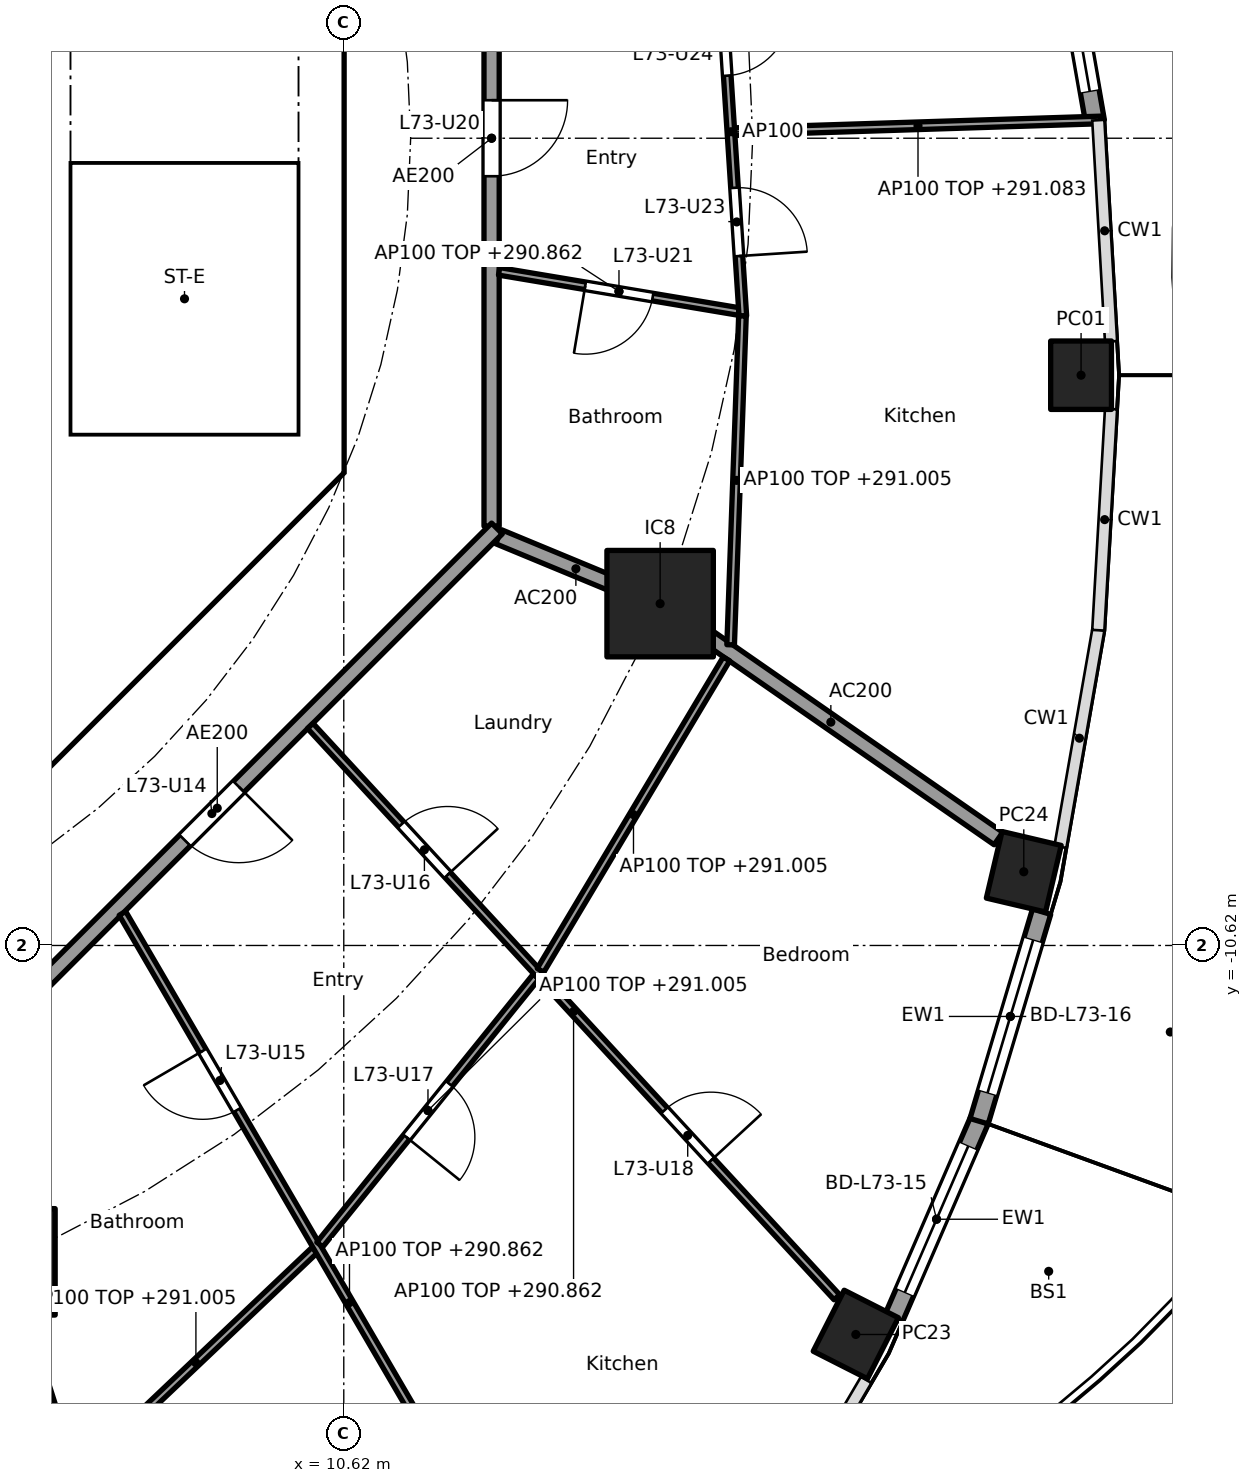
"""IFC4 building model, lengths in metres.
Left out: names, types, materials, properties, quantities, classifications, styles, units other than length and angle.
Written with IfcOpenShell. Run it as: python <this file> out.ifc"""

import sys

from ifc_helpers import new_model, si_unit, direction, frame, frame_2d, origin, origin_2d, place, context, subcontext, project, spatial, polyline, rectangle, hollow_rectangle, outline, extrude, element, fill, save


model = new_model("IFC4")
c1 = context("Model", 3, precision=1e-05, world=origin(), true_north=direction((0.0, 1.0)))
c2 = subcontext(c1, "Body", "Model", "MODEL_VIEW")
j1 = project(units=[si_unit("LENGTHUNIT", "METRE"), si_unit("PLANEANGLEUNIT", "RADIAN")], contexts=[c1])
p1 = place(None, origin())
s1 = spatial("IfcSite", under=j1, at=p1, CompositionType="ELEMENT")
p2 = place(p1, origin())
s2 = spatial("IfcBuilding", under=s1, at=p2, CompositionType="ELEMENT")
p3 = place(p2, frame((0.0, 0.0, 288.1)))
s3 = spatial("IfcBuildingStorey", under=s2, at=p3, CompositionType="ELEMENT", Elevation=288.1)
for number, where, z_axis, x_axis in (
    (1, (20.32, -3.118, 0.0), (0.0, 0.0, 1.0), (0.0, 1.0, 0.0)),
    (2, (17.356, -15.738, 0.0), (0.0, 0.0, 1.0), (0.452, 0.892, 0.0)),
    (3, (19.566, -9.65, 0.0), (0.0, 0.0, 1.0), (0.229, 0.973, 0.0)),
):
    element("IfcColumn", number, at=place(p3, frame(where, z_axis=z_axis, x_axis=x_axis)), inside=s3, PredefinedType="COLUMN", context=c2, shape_type="SweptSolid", body=[
        extrude(hollow_rectangle(XDim=0.9, YDim=0.8, WallThickness=0.028, at=origin_2d()), origin(), (0.0, 0.0, 1.0), 3.7),
    ])
for number, where, z_axis, x_axis in (
    (4, (6.123, -14.782, 0.0), (0.0, 0.0, 1.0), (1.0, 0.0, 0.0)),
    (5, (14.782, -6.123, 0.0), (0.0, 0.0, 1.0), (1.0, 0.0, 0.0)),
):
    element("IfcColumn", number, at=place(p3, frame(where, z_axis=z_axis, x_axis=x_axis)), inside=s3, PredefinedType="COLUMN", context=c2, shape_type="SweptSolid", body=[
        extrude(rectangle(XDim=1.4, YDim=1.4, at=origin_2d()), origin(), (0.0, 0.0, 1.0), 3.7),
    ])
p4 = place(p3, frame((20.004, 3.08, 0.0), z_axis=(0.0, 0.0, 1.0), x_axis=(0.172182411767, -0.985065082661, 0.0)))
e6 = element("IfcWall", 6, at=p4, inside=s3, PredefinedType="SOLIDWALL", context=c2, shape_type="SweptSolid", body=[
    extrude(rectangle(XDim=2.903, YDim=0.25, at=frame_2d((1.451, 0.0))), origin(), (0.0, 0.0, 1.0), 3.44),
])
p5 = place(p4, frame((0.401, 0.0, 0.0)))
e7 = element("IfcOpeningElement", 7, at=p5, cuts=e6, PredefinedType="OPENING", context=c2, shape_type="SweptSolid", body=[
    extrude(rectangle(XDim=2.1, YDim=2.4, at=frame_2d((1.05, 1.2))), frame((0.0, 0.135, 0.0), z_axis=(0.0, -1.0, 0.0), x_axis=(1.0, 0.0, 0.0)), (0.0, 0.0, 1.0), 0.27),
])
p6 = place(p3, frame((18.983, -12.918, 0.0), z_axis=(0.0, 0.0, 1.0), x_axis=(-0.397597791596, -0.9175598052, 0.0)))
e8 = element("IfcWall", 8, at=p6, inside=s3, PredefinedType="SOLIDWALL", context=c2, shape_type="SweptSolid", body=[
    extrude(rectangle(XDim=2.841, YDim=0.25, at=frame_2d((1.42, 0.0))), origin(), (0.0, 0.0, 1.0), 3.44),
])
p7 = place(p6, frame((0.371, 0.0, 0.0)))
e9 = element("IfcOpeningElement", 9, at=p7, cuts=e8, PredefinedType="OPENING", context=c2, shape_type="SweptSolid", body=[
    extrude(rectangle(XDim=2.1, YDim=2.4, at=frame_2d((1.05, 1.2))), frame((0.0, 0.135, 0.0), z_axis=(0.0, -1.0, 0.0), x_axis=(1.0, 0.0, 0.0)), (0.0, 0.0, 1.0), 0.27),
])
p8 = place(p3, frame((19.801, -10.175, 0.0), z_axis=(0.0, 0.0, 1.0), x_axis=(-0.285899456462, -0.958259620768, 0.0)))
e10 = element("IfcWall", 10, at=p8, inside=s3, PredefinedType="SOLIDWALL", context=c2, shape_type="SweptSolid", body=[
    extrude(rectangle(XDim=2.877, YDim=0.25, at=frame_2d((1.438, 0.0))), origin(), (0.0, 0.0, 1.0), 3.44),
])
p9 = place(p8, frame((0.389, 0.0, 0.0)))
e11 = element("IfcOpeningElement", 11, at=p9, cuts=e10, PredefinedType="OPENING", context=c2, shape_type="SweptSolid", body=[
    extrude(rectangle(XDim=2.1, YDim=2.4, at=frame_2d((1.05, 1.2))), frame((0.0, 0.135, 0.0), z_axis=(0.0, -1.0, 0.0), x_axis=(1.0, 0.0, 0.0)), (0.0, 0.0, 1.0), 0.27),
])
p10 = place(p3, frame((4.613, -9.988, 0.0), z_axis=(0.0, 0.0, 1.0), x_axis=(0.707106781187, 0.707106781187, 0.0)))
e12 = element("IfcWall", 12, at=p10, inside=s3, PredefinedType="SHEAR", context=c2, shape_type="SweptSolid", body=[
    extrude(rectangle(XDim=7.602, YDim=0.6, at=frame_2d((3.801, 0.0))), origin(), (0.0, 0.0, 1.0), 3.44),
])
p11 = place(p10, frame((3.201, 0.0, 0.0)))
e13 = element("IfcOpeningElement", 13, at=p11, cuts=e12, PredefinedType="OPENING", context=c2, shape_type="SweptSolid", body=[
    extrude(rectangle(XDim=1.2, YDim=2.1, at=frame_2d((0.6, 1.05))), frame((0.0, 0.31, 0.0), z_axis=(0.0, -1.0, 0.0), x_axis=(1.0, 0.0, 0.0)), (0.0, 0.0, 1.0), 0.62),
])
p12 = place(p3, origin())
e14 = element("IfcWall", 14, at=p12, inside=s3, PredefinedType="SHEAR", context=c2, shape_type="SweptSolid", body=[
    extrude(outline(polyline([(9.776, -4.401), (10.025, -4.152), (10.025, -3.801), (10.025, 4.152), (9.776, 4.401), (10.2, 4.825), (10.625, 4.401), (10.625, -4.401), (10.2, -4.825), (9.776, -4.401)])), origin(), (0.0, 0.0, 1.0), 3.44),
])
p13 = place(p3, origin())
e15 = element("IfcWall", 15, at=p13, inside=s3, PredefinedType="SOLIDWALL", context=c2, shape_type="SweptSolid", body=[
    extrude(outline(polyline([(7.025, -3.9), (6.7, -3.9), (6.7, 3.9), (7.025, 3.9), (7.025, -3.9)])), origin(), (0.0, 0.0, 1.0), 3.44),
])
p14 = place(p3, origin())
e16 = element("IfcWall", 16, at=p14, inside=s3, PredefinedType="SOLIDWALL", context=c2, shape_type="SweptSolid", body=[
    extrude(outline(polyline([(10.025, -4.1), (6.7, -4.1), (6.7, -3.9), (10.025, -3.9), (10.025, -4.1)])), origin(), (0.0, 0.0, 1.0), 3.44),
])
p15 = place(p3, frame((6.138, -14.83, 0.0), z_axis=(0.0, 0.0, 1.0), x_axis=(0.303653679037, -0.952782474234, 0.0)))
e17 = element("IfcWall", 17, at=p15, inside=s3, PredefinedType="PARTITIONING", context=c2, shape_type="SweptSolid", body=[
    extrude(rectangle(XDim=10.076, YDim=0.2, at=frame_2d((5.038, 0.0))), origin(), (0.0, 0.0, 1.0), 2.905),
])
p16 = place(p3, frame((12.657, -5.243, 0.0), z_axis=(0.0, 0.0, 1.0), x_axis=(0.92383017907, -0.382802560388, 0.0)))
e18 = element("IfcWall", 18, at=p16, inside=s3, PredefinedType="PARTITIONING", context=c2, shape_type="SweptSolid", body=[
    extrude(rectangle(XDim=2.2, YDim=0.2, at=frame_2d((1.1, 0.0))), origin(), (0.0, 0.0, 1.0), 3.44),
])
p17 = place(p3, frame((14.823, -6.151, 0.0), z_axis=(0.0, 0.0, 1.0), x_axis=(0.821435065081, -0.570302054928, 0.0)))
e19 = element("IfcWall", 19, at=p17, inside=s3, PredefinedType="PARTITIONING", context=c2, shape_type="SweptSolid", body=[
    extrude(rectangle(XDim=5.368, YDim=0.2, at=frame_2d((2.684, 0.0))), origin(), (0.0, 0.0, 1.0), 3.44),
])
p18 = place(p3, frame((12.565, -5.104, 0.0), z_axis=(0.0, 0.0, 1.0), x_axis=(0.0, 1.0, 0.0)))
e20 = element("IfcWall", 20, at=p18, inside=s3, PredefinedType="PARTITIONING", context=c2, shape_type="SweptSolid", body=[
    extrude(rectangle(XDim=10.209, YDim=0.2, at=frame_2d((5.104, 0.0))), origin(), (0.0, 0.0, 1.0), 3.44),
])
p19 = place(p18, frame((4.604, 0.0, 0.0)))
e21 = element("IfcOpeningElement", 21, at=p19, cuts=e20, PredefinedType="OPENING", context=c2, shape_type="SweptSolid", body=[
    extrude(rectangle(XDim=1.0, YDim=2.1, at=frame_2d((0.5, 1.05))), frame((0.0, 0.11, 0.0), z_axis=(0.0, -1.0, 0.0), x_axis=(1.0, 0.0, 0.0)), (0.0, 0.0, 1.0), 0.22),
])
p20 = place(p3, frame((5.275, -12.494, 0.0), z_axis=(0.0, 0.0, 1.0), x_axis=(0.707106781187, 0.707106781187, 0.0)))
e22 = element("IfcWall", 22, at=p20, inside=s3, PredefinedType="PARTITIONING", context=c2, shape_type="SweptSolid", body=[
    extrude(rectangle(XDim=10.409, YDim=0.2, at=frame_2d((5.205, 0.0))), origin(), (0.0, 0.0, 1.0), 3.44),
])
p21 = place(p20, frame((4.604, 0.0, 0.0)))
e23 = element("IfcOpeningElement", 23, at=p21, cuts=e22, PredefinedType="OPENING", context=c2, shape_type="SweptSolid", body=[
    extrude(rectangle(XDim=1.0, YDim=2.1, at=frame_2d((0.5, 1.05))), frame((0.0, 0.11, 0.0), z_axis=(0.0, -1.0, 0.0), x_axis=(1.0, 0.0, 0.0)), (0.0, 0.0, 1.0), 0.22),
])
p22 = place(p3, frame((12.663, -1.751, 0.0), z_axis=(0.0, 0.0, 1.0), x_axis=(0.98626156497, -0.165191178529, 0.0)))
e24 = element("IfcWall", 24, at=p22, inside=s3, PredefinedType="PARTITIONING", context=c2, shape_type="SweptSolid", body=[
    extrude(rectangle(XDim=3.198, YDim=0.1, at=frame_2d((1.599, 0.0))), origin(), (0.0, 0.0, 1.0), 2.762),
])
p23 = place(p22, frame((1.149, 0.0, 0.0)))
e25 = element("IfcOpeningElement", 25, at=p23, cuts=e24, PredefinedType="OPENING", context=c2, shape_type="SweptSolid", body=[
    extrude(rectangle(XDim=0.9, YDim=2.1, at=frame_2d((0.45, 1.05))), frame((0.0, 0.06, 0.0), z_axis=(0.0, -1.0, 0.0), x_axis=(1.0, 0.0, 0.0)), (0.0, 0.0, 1.0), 0.12),
])
p24 = place(p3, frame((15.87, -2.338, 0.0), z_axis=(0.0, 0.0, 1.0), x_axis=(-0.064797294757, 0.997898447034, 0.0)))
e26 = element("IfcWall", 26, at=p24, inside=s3, PredefinedType="PARTITIONING", context=c2, shape_type="SweptSolid", body=[
    extrude(rectangle(XDim=4.857, YDim=0.1, at=frame_2d((2.428, 0.0))), origin(), (0.0, 0.0, 1.0), 3.44),
])
p25 = place(p24, frame((0.789, 0.0, 0.0)))
e27 = element("IfcOpeningElement", 27, at=p25, cuts=e26, PredefinedType="OPENING", context=c2, shape_type="SweptSolid", body=[
    extrude(rectangle(XDim=0.9, YDim=2.1, at=frame_2d((0.45, 1.05))), frame((0.0, 0.06, 0.0), z_axis=(0.0, -1.0, 0.0), x_axis=(1.0, 0.0, 0.0)), (0.0, 0.0, 1.0), 0.12),
])
p26 = place(p24, frame((3.167, 0.0, 0.0)))
e28 = element("IfcOpeningElement", 28, at=p26, cuts=e26, PredefinedType="OPENING", context=c2, shape_type="SweptSolid", body=[
    extrude(rectangle(XDim=0.9, YDim=2.1, at=frame_2d((0.45, 1.05))), frame((0.0, 0.06, 0.0), z_axis=(0.0, -1.0, 0.0), x_axis=(1.0, 0.0, 0.0)), (0.0, 0.0, 1.0), 0.12),
])
p27 = place(p3, frame((15.865, -2.338, 0.0), z_axis=(0.0, 0.0, 1.0), x_axis=(-0.035864509465, -0.999356661538, 0.0)))
e29 = element("IfcWall", 29, at=p27, inside=s3, PredefinedType="PARTITIONING", context=c2, shape_type="SweptSolid", body=[
    extrude(rectangle(XDim=4.329, YDim=0.1, at=frame_2d((2.165, 0.0))), origin(), (0.0, 0.0, 1.0), 2.905),
])
p28 = place(p3, frame((15.763, 0.087, 0.0), z_axis=(0.0, 0.0, 1.0), x_axis=(0.999492034598, 0.03186962151, 0.0)))
e30 = element("IfcWall", 30, at=p28, inside=s3, PredefinedType="PARTITIONING", context=c2, shape_type="SweptSolid", body=[
    extrude(rectangle(XDim=4.826, YDim=0.1, at=frame_2d((2.413, 0.0))), origin(), (0.0, 0.0, 1.0), 2.983),
])
p29 = place(p3, frame((7.113, -17.592, 0.0), z_axis=(0.0, 0.0, 1.0), x_axis=(0.725433932329, 0.688291805723, 0.0)))
e31 = element("IfcWall", 31, at=p29, inside=s3, PredefinedType="PARTITIONING", context=c2, shape_type="SweptSolid", body=[
    extrude(rectangle(XDim=4.305, YDim=0.1, at=frame_2d((2.153, 0.0))), origin(), (0.0, 0.0, 1.0), 2.905),
])
p30 = place(p3, frame((7.708, -10.198, 0.0), z_axis=(0.0, 0.0, 1.0), x_axis=(0.503839015963, -0.863797572347, 0.0)))
e32 = element("IfcWall", 32, at=p30, inside=s3, PredefinedType="PARTITIONING", context=c2, shape_type="SweptSolid", body=[
    extrude(rectangle(XDim=11.856, YDim=0.1, at=frame_2d((5.928, 0.0))), origin(), (0.0, 0.0, 1.0), 2.762),
])
p31 = place(p30, frame((2.095, 0.0, 0.0)))
e33 = element("IfcOpeningElement", 33, at=p31, cuts=e32, PredefinedType="OPENING", context=c2, shape_type="SweptSolid", body=[
    extrude(rectangle(XDim=0.9, YDim=2.1, at=frame_2d((0.45, 1.05))), frame((0.0, 0.06, 0.0), z_axis=(0.0, -1.0, 0.0), x_axis=(1.0, 0.0, 0.0)), (0.0, 0.0, 1.0), 0.12),
])
p32 = place(p30, frame((8.023, 0.0, 0.0)))
e34 = element("IfcOpeningElement", 34, at=p32, cuts=e32, PredefinedType="OPENING", context=c2, shape_type="SweptSolid", body=[
    extrude(rectangle(XDim=0.9, YDim=2.1, at=frame_2d((0.45, 1.05))), frame((0.0, 0.06, 0.0), z_axis=(0.0, -1.0, 0.0), x_axis=(1.0, 0.0, 0.0)), (0.0, 0.0, 1.0), 0.12),
])
p33 = place(p3, frame((10.304, -14.555, 0.0), z_axis=(0.0, 0.0, 1.0), x_axis=(0.628170338674, 0.778075848237, 0.0)))
e35 = element("IfcWall", 35, at=p33, inside=s3, PredefinedType="PARTITIONING", context=c2, shape_type="SweptSolid", body=[
    extrude(rectangle(XDim=4.532, YDim=0.1, at=frame_2d((2.266, 0.0))), origin(), (0.0, 0.0, 1.0), 2.905),
])
p34 = place(p33, frame((1.816, 0.0, 0.0)))
e36 = element("IfcOpeningElement", 36, at=p34, cuts=e35, PredefinedType="OPENING", context=c2, shape_type="SweptSolid", body=[
    extrude(rectangle(XDim=0.9, YDim=2.1, at=frame_2d((0.45, 1.05))), frame((0.0, 0.06, 0.0), z_axis=(0.0, -1.0, 0.0), x_axis=(1.0, 0.0, 0.0)), (0.0, 0.0, 1.0), 0.12),
])
p35 = place(p3, frame((10.179, -7.731, 0.0), z_axis=(0.0, 0.0, 1.0), x_axis=(0.67775318564, -0.73528947997, 0.0)))
e37 = element("IfcWall", 37, at=p35, inside=s3, PredefinedType="PARTITIONING", context=c2, shape_type="SweptSolid", body=[
    extrude(rectangle(XDim=10.222, YDim=0.1, at=frame_2d((5.111, 0.0))), origin(), (0.0, 0.0, 1.0), 2.762),
])
p36 = place(p35, frame((1.766, 0.0, 0.0)))
e38 = element("IfcOpeningElement", 38, at=p36, cuts=e37, PredefinedType="OPENING", context=c2, shape_type="SweptSolid", body=[
    extrude(rectangle(XDim=0.9, YDim=2.1, at=frame_2d((0.45, 1.05))), frame((0.0, 0.06, 0.0), z_axis=(0.0, -1.0, 0.0), x_axis=(1.0, 0.0, 0.0)), (0.0, 0.0, 1.0), 0.12),
])
p37 = place(p35, frame((6.877, 0.0, 0.0)))
e39 = element("IfcOpeningElement", 39, at=p37, cuts=e37, PredefinedType="OPENING", context=c2, shape_type="SweptSolid", body=[
    extrude(rectangle(XDim=0.9, YDim=2.1, at=frame_2d((0.45, 1.05))), frame((0.0, 0.06, 0.0), z_axis=(0.0, -1.0, 0.0), x_axis=(1.0, 0.0, 0.0)), (0.0, 0.0, 1.0), 0.12),
])
p38 = place(p3, frame((13.208, -10.947, 0.0), z_axis=(0.0, 0.0, 1.0), x_axis=(0.512726452516, 0.858552028063, 0.0)))
e40 = element("IfcWall", 40, at=p38, inside=s3, PredefinedType="PARTITIONING", context=c2, shape_type="SweptSolid", body=[
    extrude(rectangle(XDim=4.772, YDim=0.1, at=frame_2d((2.386, 0.0))), origin(), (0.0, 0.0, 1.0), 2.905),
])
p39 = place(p5, origin())
e41 = element("IfcDoor", 41, at=p39, inside=s3, OperationType="SLIDING_TO_LEFT", PredefinedType="DOOR", context=c2, shape_type="SweptSolid", body=[
    extrude(rectangle(XDim=2.1, YDim=2.4, at=frame_2d((1.05, 1.2))), frame((0.0, 0.025, 0.0), z_axis=(0.0, -1.0, 0.0), x_axis=(1.0, 0.0, 0.0)), (0.0, 0.0, 1.0), 0.05),
])
fill(e7, e41)
p40 = place(p7, origin())
e42 = element("IfcDoor", 42, at=p40, inside=s3, OperationType="SLIDING_TO_LEFT", PredefinedType="DOOR", context=c2, shape_type="SweptSolid", body=[
    extrude(rectangle(XDim=2.1, YDim=2.4, at=frame_2d((1.05, 1.2))), frame((0.0, 0.025, 0.0), z_axis=(0.0, -1.0, 0.0), x_axis=(1.0, 0.0, 0.0)), (0.0, 0.0, 1.0), 0.05),
])
fill(e9, e42)
p41 = place(p9, origin())
e43 = element("IfcDoor", 43, at=p41, inside=s3, OperationType="SLIDING_TO_LEFT", PredefinedType="DOOR", context=c2, shape_type="SweptSolid", body=[
    extrude(rectangle(XDim=2.1, YDim=2.4, at=frame_2d((1.05, 1.2))), frame((0.0, 0.025, 0.0), z_axis=(0.0, -1.0, 0.0), x_axis=(1.0, 0.0, 0.0)), (0.0, 0.0, 1.0), 0.05),
])
fill(e11, e43)
p42 = place(p11, origin())
e44 = element("IfcDoor", 44, at=p42, inside=s3, OperationType="SINGLE_SWING_LEFT", PredefinedType="DOOR", context=c2, shape_type="SweptSolid", body=[
    extrude(rectangle(XDim=1.2, YDim=2.1, at=frame_2d((0.6, 1.05))), frame((0.0, 0.025, 0.0), z_axis=(0.0, -1.0, 0.0), x_axis=(1.0, 0.0, 0.0)), (0.0, 0.0, 1.0), 0.05),
])
fill(e13, e44)
p43 = place(p21, frame((1.0, 0.0, 0.0), x_axis=(-1.0, 0.0, 0.0)))
e45 = element("IfcDoor", 45, at=p43, inside=s3, OperationType="SINGLE_SWING_LEFT", PredefinedType="DOOR", context=c2, shape_type="SweptSolid", body=[
    extrude(rectangle(XDim=1.0, YDim=2.1, at=frame_2d((0.5, 1.05))), frame((0.0, 0.025, 0.0), z_axis=(0.0, -1.0, 0.0), x_axis=(1.0, 0.0, 0.0)), (0.0, 0.0, 1.0), 0.05),
])
fill(e23, e45)
p44 = place(p31, frame((0.9, 0.0, 0.0), x_axis=(-1.0, 0.0, 0.0)))
e46 = element("IfcDoor", 46, at=p44, inside=s3, OperationType="SINGLE_SWING_RIGHT", PredefinedType="DOOR", context=c2, shape_type="SweptSolid", body=[
    extrude(rectangle(XDim=0.9, YDim=2.1, at=frame_2d((0.45, 1.05))), frame((0.0, 0.025, 0.0), z_axis=(0.0, -1.0, 0.0), x_axis=(1.0, 0.0, 0.0)), (0.0, 0.0, 1.0), 0.05),
])
fill(e33, e46)
p45 = place(p36, origin())
e47 = element("IfcDoor", 47, at=p45, inside=s3, OperationType="SINGLE_SWING_RIGHT", PredefinedType="DOOR", context=c2, shape_type="SweptSolid", body=[
    extrude(rectangle(XDim=0.9, YDim=2.1, at=frame_2d((0.45, 1.05))), frame((0.0, 0.025, 0.0), z_axis=(0.0, -1.0, 0.0), x_axis=(1.0, 0.0, 0.0)), (0.0, 0.0, 1.0), 0.05),
])
fill(e38, e47)
p46 = place(p34, frame((0.9, 0.0, 0.0), x_axis=(-1.0, 0.0, 0.0)))
e48 = element("IfcDoor", 48, at=p46, inside=s3, OperationType="SINGLE_SWING_RIGHT", PredefinedType="DOOR", context=c2, shape_type="SweptSolid", body=[
    extrude(rectangle(XDim=0.9, YDim=2.1, at=frame_2d((0.45, 1.05))), frame((0.0, 0.025, 0.0), z_axis=(0.0, -1.0, 0.0), x_axis=(1.0, 0.0, 0.0)), (0.0, 0.0, 1.0), 0.05),
])
fill(e36, e48)
p47 = place(p37, origin())
e49 = element("IfcDoor", 49, at=p47, inside=s3, OperationType="SINGLE_SWING_RIGHT", PredefinedType="DOOR", context=c2, shape_type="SweptSolid", body=[
    extrude(rectangle(XDim=0.9, YDim=2.1, at=frame_2d((0.45, 1.05))), frame((0.0, 0.025, 0.0), z_axis=(0.0, -1.0, 0.0), x_axis=(1.0, 0.0, 0.0)), (0.0, 0.0, 1.0), 0.05),
])
fill(e39, e49)
p48 = place(p19, frame((1.0, 0.0, 0.0), x_axis=(-1.0, 0.0, 0.0)))
e50 = element("IfcDoor", 50, at=p48, inside=s3, OperationType="SINGLE_SWING_LEFT", PredefinedType="DOOR", context=c2, shape_type="SweptSolid", body=[
    extrude(rectangle(XDim=1.0, YDim=2.1, at=frame_2d((0.5, 1.05))), frame((0.0, 0.025, 0.0), z_axis=(0.0, -1.0, 0.0), x_axis=(1.0, 0.0, 0.0)), (0.0, 0.0, 1.0), 0.05),
])
fill(e21, e50)
p49 = place(p23, frame((0.9, 0.0, 0.0), x_axis=(-1.0, 0.0, 0.0)))
e51 = element("IfcDoor", 51, at=p49, inside=s3, OperationType="SINGLE_SWING_RIGHT", PredefinedType="DOOR", context=c2, shape_type="SweptSolid", body=[
    extrude(rectangle(XDim=0.9, YDim=2.1, at=frame_2d((0.45, 1.05))), frame((0.0, 0.025, 0.0), z_axis=(0.0, -1.0, 0.0), x_axis=(1.0, 0.0, 0.0)), (0.0, 0.0, 1.0), 0.05),
])
fill(e25, e51)
p50 = place(p25, frame((0.9, 0.0, 0.0), x_axis=(-1.0, 0.0, 0.0)))
e52 = element("IfcDoor", 52, at=p50, inside=s3, OperationType="SINGLE_SWING_RIGHT", PredefinedType="DOOR", context=c2, shape_type="SweptSolid", body=[
    extrude(rectangle(XDim=0.9, YDim=2.1, at=frame_2d((0.45, 1.05))), frame((0.0, 0.025, 0.0), z_axis=(0.0, -1.0, 0.0), x_axis=(1.0, 0.0, 0.0)), (0.0, 0.0, 1.0), 0.05),
])
fill(e27, e52)
p51 = place(p26, frame((0.9, 0.0, 0.0), x_axis=(-1.0, 0.0, 0.0)))
e53 = element("IfcDoor", 53, at=p51, inside=s3, OperationType="SINGLE_SWING_LEFT", PredefinedType="DOOR", context=c2, shape_type="SweptSolid", body=[
    extrude(rectangle(XDim=0.9, YDim=2.1, at=frame_2d((0.45, 1.05))), frame((0.0, 0.025, 0.0), z_axis=(0.0, -1.0, 0.0), x_axis=(1.0, 0.0, 0.0)), (0.0, 0.0, 1.0), 0.05),
])
fill(e28, e53)
save(model, sys.argv[1])
